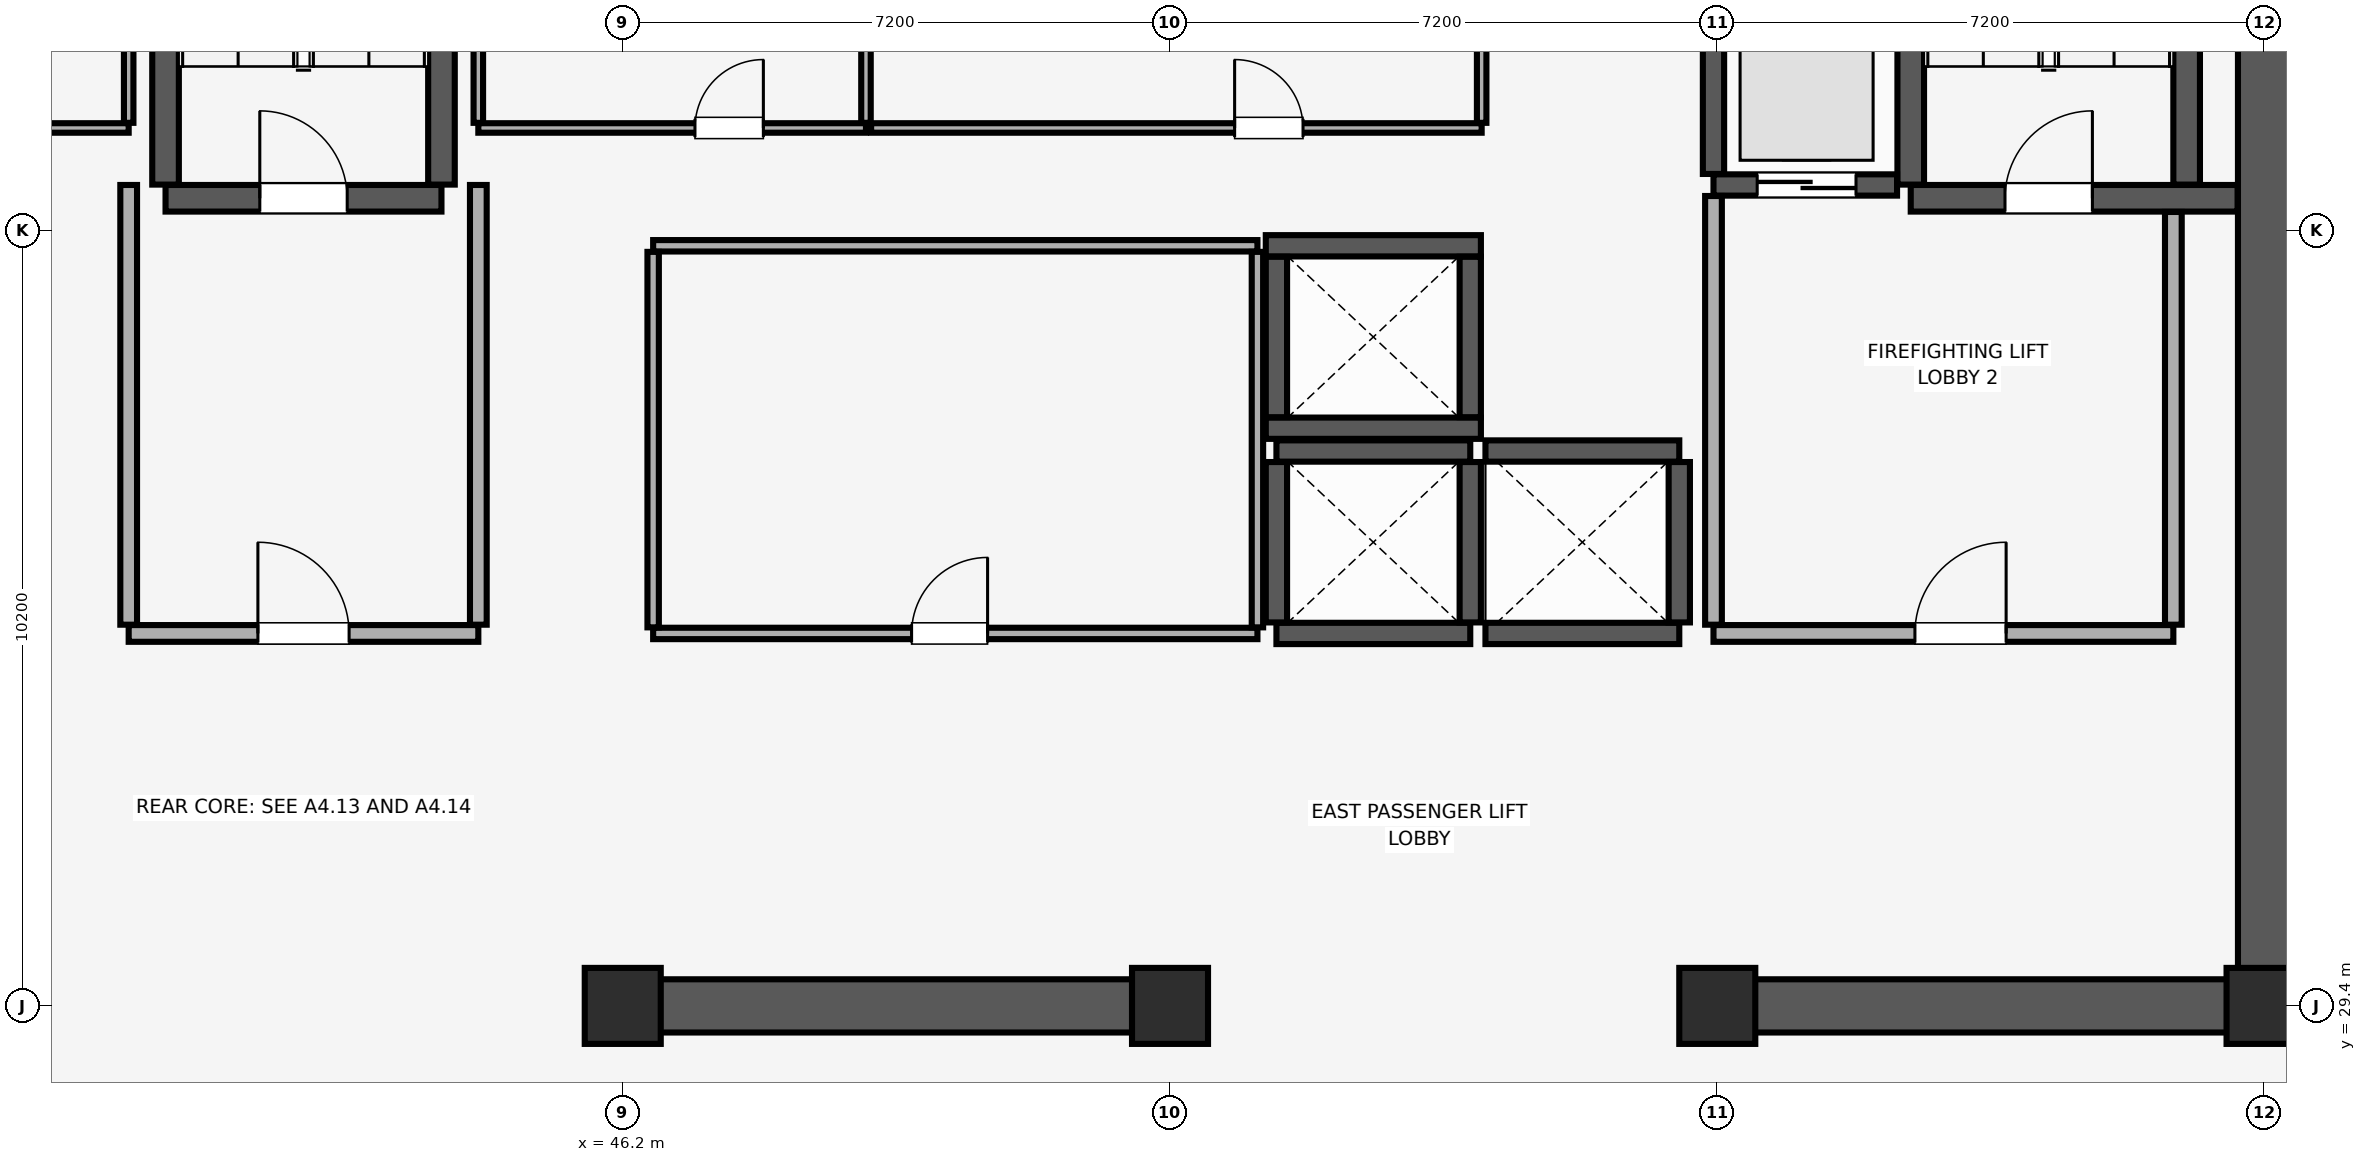
"""IFC4 building model, lengths in metres.
Left out: names, types, materials, properties, quantities, classifications, styles, units other than length and angle.
Written with IfcOpenShell. Run it as: python <this file> out.ifc"""

import sys

from ifc_helpers import new_model, si_unit, direction, frame, frame_2d, origin, origin_2d, place, context, subcontext, project, spatial, rectangle, extrude, element, fill, save


model = new_model("IFC4")
c1 = context("Model", 3, precision=1e-05, world=origin(), true_north=direction((0.0, 1.0)))
c2 = subcontext(c1, "Body", "Model", "MODEL_VIEW")
j1 = project(units=[si_unit("LENGTHUNIT", "METRE"), si_unit("PLANEANGLEUNIT", "RADIAN")], contexts=[c1])
p1 = place(None, origin())
s1 = spatial("IfcSite", under=j1, at=p1, CompositionType="ELEMENT")
p2 = place(p1, origin())
s2 = spatial("IfcBuilding", under=s1, at=p2, CompositionType="ELEMENT")
p3 = place(p2, frame((0.0, 0.0, 280.5)))
s3 = spatial("IfcBuildingStorey", under=s2, at=p3, CompositionType="ELEMENT", Elevation=280.5)
for number, where, z_axis, x_axis in (
    (1, (46.2, 29.4, 0.0), (0.0, 0.0, 1.0), (1.0, 0.0, 0.0)),
    (2, (53.4, 29.4, 0.0), (0.0, 0.0, 1.0), (1.0, 0.0, 0.0)),
    (3, (60.6, 29.4, 0.0), (0.0, 0.0, 1.0), (1.0, 0.0, 0.0)),
    (4, (67.8, 29.4, 0.0), (0.0, 0.0, 1.0), (1.0, 0.0, 0.0)),
):
    element("IfcColumn", number, at=place(p3, frame(where, z_axis=z_axis, x_axis=x_axis)), inside=s3, PredefinedType="COLUMN", context=c2, shape_type="SweptSolid", body=[
        extrude(rectangle(XDim=1.0, YDim=1.0, at=origin_2d()), origin(), (0.0, 0.0, 1.0), 5.1),
    ])
p4 = place(p3, frame((67.8, 29.4, 0.0), z_axis=(0.0, 0.0, 1.0), x_axis=(0.0, 1.0, 0.0)))
e5 = element("IfcWall", 5, at=p4, inside=s3, PredefinedType="SHEAR", context=c2, shape_type="SweptSolid", body=[
    extrude(rectangle(XDim=19.2, YDim=0.7, at=frame_2d((9.6, 0.0))), origin(), (0.0, 0.0, 1.0), 5.1),
])
p5 = place(p3, frame((46.0, 29.4, 0.0), z_axis=(0.0, 0.0, 1.0), x_axis=(1.0, 0.0, 0.0)))
e6 = element("IfcWall", 6, at=p5, inside=s3, PredefinedType="SHEAR", context=c2, shape_type="SweptSolid", body=[
    extrude(rectangle(XDim=7.6, YDim=0.7, at=frame_2d((3.8, 0.0))), origin(), (0.0, 0.0, 1.0), 5.1),
])
p6 = place(p3, frame((60.4, 29.4, 0.0), z_axis=(0.0, 0.0, 1.0), x_axis=(1.0, 0.0, 0.0)))
e7 = element("IfcWall", 7, at=p6, inside=s3, PredefinedType="SHEAR", context=c2, shape_type="SweptSolid", body=[
    extrude(rectangle(XDim=7.045, YDim=0.7, at=frame_2d((3.522, 0.0))), origin(), (0.0, 0.0, 1.0), 5.1),
])
p7 = place(p3, frame((40.185, 40.025, 0.0), z_axis=(0.0, 0.0, 1.0), x_axis=(1.0, 0.0, 0.0)))
e8 = element("IfcWall", 8, at=p7, inside=s3, PredefinedType="SHEAR", context=c2, shape_type="SweptSolid", body=[
    extrude(rectangle(XDim=3.63, YDim=0.35, at=frame_2d((1.815, 0.0))), origin(), (0.0, 0.0, 1.0), 5.1),
])
p8 = place(p7, frame((1.24, 0.0, 0.0)))
e9 = element("IfcOpeningElement", 9, at=p8, cuts=e8, PredefinedType="OPENING", context=c2, shape_type="SweptSolid", body=[
    extrude(rectangle(XDim=1.15, YDim=2.15, at=frame_2d((0.575, 1.075))), frame((0.0, 0.185, 0.0), z_axis=(0.0, -1.0, 0.0), x_axis=(1.0, 0.0, 0.0)), (0.0, 0.0, 1.0), 0.37),
])
for number, where, z_axis, x_axis in (
    (10, (40.185, 40.205, 0.0), (0.0, 0.0, 1.0), (0.0, 1.0, 0.0)),
    (11, (43.815, 40.205, 0.0), (0.0, 0.0, 1.0), (0.0, 1.0, 0.0)),
):
    element("IfcWall", number, at=place(p3, frame(where, z_axis=z_axis, x_axis=x_axis)), inside=s3, PredefinedType="SHEAR", context=c2, shape_type="SweptSolid", body=[
        extrude(rectangle(XDim=8.09, YDim=0.35, at=frame_2d((4.045, 0.0))), origin(), (0.0, 0.0, 1.0), 5.1),
    ])
p9 = place(p3, frame((63.145, 40.025, 0.0), z_axis=(0.0, 0.0, 1.0), x_axis=(1.0, 0.0, 0.0)))
e12 = element("IfcWall", 12, at=p9, inside=s3, PredefinedType="SHEAR", context=c2, shape_type="SweptSolid", body=[
    extrude(rectangle(XDim=4.3, YDim=0.35, at=frame_2d((2.15, 0.0))), origin(), (0.0, 0.0, 1.0), 5.1),
])
p10 = place(p9, frame((1.24, 0.0, 0.0)))
e13 = element("IfcOpeningElement", 13, at=p10, cuts=e12, PredefinedType="OPENING", context=c2, shape_type="SweptSolid", body=[
    extrude(rectangle(XDim=1.15, YDim=2.15, at=frame_2d((0.575, 1.075))), frame((0.0, 0.185, 0.0), z_axis=(0.0, -1.0, 0.0), x_axis=(1.0, 0.0, 0.0)), (0.0, 0.0, 1.0), 0.37),
])
for number, where, z_axis, x_axis in (
    (14, (63.145, 40.205, 0.0), (0.0, 0.0, 1.0), (0.0, 1.0, 0.0)),
    (15, (66.775, 40.205, 0.0), (0.0, 0.0, 1.0), (0.0, 1.0, 0.0)),
):
    element("IfcWall", number, at=place(p3, frame(where, z_axis=z_axis, x_axis=x_axis)), inside=s3, PredefinedType="SHEAR", context=c2, shape_type="SweptSolid", body=[
        extrude(rectangle(XDim=8.09, YDim=0.35, at=frame_2d((4.045, 0.0))), origin(), (0.0, 0.0, 1.0), 5.1),
    ])
for number, where, z_axis, x_axis in (
    (16, (54.8, 34.3, 0.0), (0.0, 0.0, 1.0), (1.0, 0.0, 0.0)),
    (17, (54.8, 36.7, 0.0), (0.0, 0.0, 1.0), (1.0, 0.0, 0.0)),
):
    element("IfcWall", number, at=place(p3, frame(where, z_axis=z_axis, x_axis=x_axis)), inside=s3, PredefinedType="SHEAR", context=c2, shape_type="SweptSolid", body=[
        extrude(rectangle(XDim=2.55, YDim=0.28, at=frame_2d((1.275, 0.0))), origin(), (0.0, 0.0, 1.0), 5.1),
    ])
for number, where, z_axis, x_axis in (
    (18, (54.8, 34.445, 0.0), (0.0, 0.0, 1.0), (0.0, 1.0, 0.0)),
    (19, (57.35, 34.445, 0.0), (0.0, 0.0, 1.0), (0.0, 1.0, 0.0)),
):
    element("IfcWall", number, at=place(p3, frame(where, z_axis=z_axis, x_axis=x_axis)), inside=s3, PredefinedType="SHEAR", context=c2, shape_type="SweptSolid", body=[
        extrude(rectangle(XDim=2.11, YDim=0.28, at=frame_2d((1.055, 0.0))), origin(), (0.0, 0.0, 1.0), 5.1),
    ])
for number, where, z_axis, x_axis in (
    (20, (57.55, 34.3, 0.0), (0.0, 0.0, 1.0), (1.0, 0.0, 0.0)),
    (21, (57.55, 36.7, 0.0), (0.0, 0.0, 1.0), (1.0, 0.0, 0.0)),
):
    element("IfcWall", number, at=place(p3, frame(where, z_axis=z_axis, x_axis=x_axis)), inside=s3, PredefinedType="SHEAR", context=c2, shape_type="SweptSolid", body=[
        extrude(rectangle(XDim=2.55, YDim=0.28, at=frame_2d((1.275, 0.0))), origin(), (0.0, 0.0, 1.0), 5.1),
    ])
p11 = place(p3, frame((60.1, 34.445, 0.0), z_axis=(0.0, 0.0, 1.0), x_axis=(0.0, 1.0, 0.0)))
e22 = element("IfcWall", 22, at=p11, inside=s3, PredefinedType="SHEAR", context=c2, shape_type="SweptSolid", body=[
    extrude(rectangle(XDim=2.11, YDim=0.28, at=frame_2d((1.055, 0.0))), origin(), (0.0, 0.0, 1.0), 5.1),
])
for number, where, z_axis, x_axis in (
    (23, (54.66, 37.0, 0.0), (0.0, 0.0, 1.0), (1.0, 0.0, 0.0)),
    (24, (54.66, 39.4, 0.0), (0.0, 0.0, 1.0), (1.0, 0.0, 0.0)),
):
    element("IfcWall", number, at=place(p3, frame(where, z_axis=z_axis, x_axis=x_axis)), inside=s3, PredefinedType="SHEAR", context=c2, shape_type="SweptSolid", body=[
        extrude(rectangle(XDim=2.83, YDim=0.28, at=frame_2d((1.415, 0.0))), origin(), (0.0, 0.0, 1.0), 5.1),
    ])
for number, where, z_axis, x_axis in (
    (25, (54.8, 37.145, 0.0), (0.0, 0.0, 1.0), (0.0, 1.0, 0.0)),
    (26, (57.35, 37.145, 0.0), (0.0, 0.0, 1.0), (0.0, 1.0, 0.0)),
):
    element("IfcWall", number, at=place(p3, frame(where, z_axis=z_axis, x_axis=x_axis)), inside=s3, PredefinedType="SHEAR", context=c2, shape_type="SweptSolid", body=[
        extrude(rectangle(XDim=2.11, YDim=0.28, at=frame_2d((1.055, 0.0))), origin(), (0.0, 0.0, 1.0), 5.1),
    ])
p12 = place(p3, frame((60.55, 40.2, 0.0), z_axis=(0.0, 0.0, 1.0), x_axis=(1.0, 0.0, 0.0)))
e27 = element("IfcWall", 27, at=p12, inside=s3, PredefinedType="SHEAR", context=c2, shape_type="SweptSolid", body=[
    extrude(rectangle(XDim=2.415, YDim=0.28, at=frame_2d((1.208, 0.0))), origin(), (0.0, 0.0, 1.0), 5.1),
])
p13 = place(p12, frame((0.575, 0.0, 0.0)))
e28 = element("IfcOpeningElement", 28, at=p13, cuts=e27, PredefinedType="OPENING", context=c2, shape_type="SweptSolid", body=[
    extrude(rectangle(XDim=1.3, YDim=2.3, at=frame_2d((0.65, 1.15))), frame((0.0, 0.15, 0.0), z_axis=(0.0, -1.0, 0.0), x_axis=(1.0, 0.0, 0.0)), (0.0, 0.0, 1.0), 0.3),
])
p14 = place(p3, frame((60.55, 40.345, 0.0), z_axis=(0.0, 0.0, 1.0), x_axis=(0.0, 1.0, 0.0)))
e29 = element("IfcWall", 29, at=p14, inside=s3, PredefinedType="SHEAR", context=c2, shape_type="SweptSolid", body=[
    extrude(rectangle(XDim=2.81, YDim=0.28, at=frame_2d((1.405, 0.0))), origin(), (0.0, 0.0, 1.0), 5.1),
])
p15 = place(p3, frame((60.55, 34.3, 0.0), z_axis=(0.0, 0.0, 1.0), x_axis=(1.0, 0.0, 0.0)))
e30 = element("IfcWall", 30, at=p15, inside=s3, PredefinedType="PARTITIONING", context=c2, shape_type="SweptSolid", body=[
    extrude(rectangle(XDim=6.05, YDim=0.22, at=frame_2d((3.025, 0.0))), origin(), (0.0, 0.0, 1.0), 5.1),
])
p16 = place(p15, frame((2.65, 0.0, 0.0)))
e31 = element("IfcOpeningElement", 31, at=p16, cuts=e30, PredefinedType="OPENING", context=c2, shape_type="SweptSolid", body=[
    extrude(rectangle(XDim=1.2, YDim=2.15, at=frame_2d((0.6, 1.075))), frame((0.0, 0.12, 0.0), z_axis=(0.0, -1.0, 0.0), x_axis=(1.0, 0.0, 0.0)), (0.0, 0.0, 1.0), 0.24),
])
p17 = place(p3, frame((60.55, 34.415, 0.0), z_axis=(0.0, 0.0, 1.0), x_axis=(0.0, 1.0, 0.0)))
e32 = element("IfcWall", 32, at=p17, inside=s3, PredefinedType="PARTITIONING", context=c2, shape_type="SweptSolid", body=[
    extrude(rectangle(XDim=5.64, YDim=0.22, at=frame_2d((2.82, 0.0))), origin(), (0.0, 0.0, 1.0), 5.1),
])
p18 = place(p3, frame((66.6, 34.415, 0.0), z_axis=(0.0, 0.0, 1.0), x_axis=(0.0, 1.0, 0.0)))
e33 = element("IfcWall", 33, at=p18, inside=s3, PredefinedType="PARTITIONING", context=c2, shape_type="SweptSolid", body=[
    extrude(rectangle(XDim=5.43, YDim=0.22, at=frame_2d((2.715, 0.0))), origin(), (0.0, 0.0, 1.0), 5.1),
])
p19 = place(p3, frame((39.7, 34.3, 0.0), z_axis=(0.0, 0.0, 1.0), x_axis=(1.0, 0.0, 0.0)))
e34 = element("IfcWall", 34, at=p19, inside=s3, PredefinedType="PARTITIONING", context=c2, shape_type="SweptSolid", body=[
    extrude(rectangle(XDim=4.6, YDim=0.22, at=frame_2d((2.3, 0.0))), origin(), (0.0, 0.0, 1.0), 5.1),
])
p20 = place(p19, frame((1.7, 0.0, 0.0)))
e35 = element("IfcOpeningElement", 35, at=p20, cuts=e34, PredefinedType="OPENING", context=c2, shape_type="SweptSolid", body=[
    extrude(rectangle(XDim=1.2, YDim=2.15, at=frame_2d((0.6, 1.075))), frame((0.0, 0.12, 0.0), z_axis=(0.0, -1.0, 0.0), x_axis=(1.0, 0.0, 0.0)), (0.0, 0.0, 1.0), 0.24),
])
for number, where, z_axis, x_axis in (
    (36, (39.7, 34.415, 0.0), (0.0, 0.0, 1.0), (0.0, 1.0, 0.0)),
    (37, (44.3, 34.415, 0.0), (0.0, 0.0, 1.0), (0.0, 1.0, 0.0)),
):
    element("IfcWall", number, at=place(p3, frame(where, z_axis=z_axis, x_axis=x_axis)), inside=s3, PredefinedType="PARTITIONING", context=c2, shape_type="SweptSolid", body=[
        extrude(rectangle(XDim=5.785, YDim=0.22, at=frame_2d((2.893, 0.0))), origin(), (0.0, 0.0, 1.0), 5.1),
    ])
p21 = place(p3, frame((46.6, 34.3, 0.0), z_axis=(0.0, 0.0, 1.0), x_axis=(1.0, 0.0, 0.0)))
e38 = element("IfcWall", 38, at=p21, inside=s3, PredefinedType="PARTITIONING", context=c2, shape_type="SweptSolid", body=[
    extrude(rectangle(XDim=7.95, YDim=0.15, at=frame_2d((3.975, 0.0))), origin(), (0.0, 0.0, 1.0), 5.1),
])
p22 = place(p21, frame((3.4, 0.0, 0.0)))
e39 = element("IfcOpeningElement", 39, at=p22, cuts=e38, PredefinedType="OPENING", context=c2, shape_type="SweptSolid", body=[
    extrude(rectangle(XDim=1.0, YDim=2.15, at=frame_2d((0.5, 1.075))), frame((0.0, 0.085, 0.0), z_axis=(0.0, -1.0, 0.0), x_axis=(1.0, 0.0, 0.0)), (0.0, 0.0, 1.0), 0.17),
])
p23 = place(p3, frame((46.6, 39.4, 0.0), z_axis=(0.0, 0.0, 1.0), x_axis=(1.0, 0.0, 0.0)))
e40 = element("IfcWall", 40, at=p23, inside=s3, PredefinedType="PARTITIONING", context=c2, shape_type="SweptSolid", body=[
    extrude(rectangle(XDim=7.95, YDim=0.15, at=frame_2d((3.975, 0.0))), origin(), (0.0, 0.0, 1.0), 5.1),
])
for number, where, z_axis, x_axis in (
    (41, (46.6, 34.38, 0.0), (0.0, 0.0, 1.0), (0.0, 1.0, 0.0)),
    (42, (54.55, 34.38, 0.0), (0.0, 0.0, 1.0), (0.0, 1.0, 0.0)),
):
    element("IfcWall", number, at=place(p3, frame(where, z_axis=z_axis, x_axis=x_axis)), inside=s3, PredefinedType="PARTITIONING", context=c2, shape_type="SweptSolid", body=[
        extrude(rectangle(XDim=4.94, YDim=0.15, at=frame_2d((2.47, 0.0))), origin(), (0.0, 0.0, 1.0), 5.1),
    ])
p24 = place(p3, frame((36.11, 40.95, 0.0), z_axis=(0.0, 0.0, 1.0), x_axis=(1.0, 0.0, 0.0)))
e43 = element("IfcWall", 43, at=p24, inside=s3, PredefinedType="PARTITIONING", context=c2, shape_type="SweptSolid", body=[
    extrude(rectangle(XDim=3.59, YDim=0.125, at=frame_2d((1.795, 0.0))), origin(), (0.0, 0.0, 1.0), 5.1),
])
p25 = place(p24, frame((1.34, 0.0, 0.0)))
e44 = element("IfcOpeningElement", 44, at=p25, cuts=e43, PredefinedType="OPENING", context=c2, shape_type="SweptSolid", body=[
    extrude(rectangle(XDim=0.9, YDim=2.1, at=frame_2d((0.45, 1.05))), frame((0.0, 0.073, 0.0), z_axis=(0.0, -1.0, 0.0), x_axis=(1.0, 0.0, 0.0)), (0.0, 0.0, 1.0), 0.145),
])
p26 = place(p3, frame((39.7, 41.018, 0.0), z_axis=(0.0, 0.0, 1.0), x_axis=(0.0, 1.0, 0.0)))
e45 = element("IfcWall", 45, at=p26, inside=s3, PredefinedType="PARTITIONING", context=c2, shape_type="SweptSolid", body=[
    extrude(rectangle(XDim=3.715, YDim=0.125, at=frame_2d((1.857, 0.0))), origin(), (0.0, 0.0, 1.0), 5.1),
])
p27 = place(p3, frame((44.3, 40.95, 0.0), z_axis=(0.0, 0.0, 1.0), x_axis=(1.0, 0.0, 0.0)))
e46 = element("IfcWall", 46, at=p27, inside=s3, PredefinedType="PARTITIONING", context=c2, shape_type="SweptSolid", body=[
    extrude(rectangle(XDim=5.1, YDim=0.125, at=frame_2d((2.55, 0.0))), origin(), (0.0, 0.0, 1.0), 5.1),
])
p28 = place(p27, frame((2.85, 0.0, 0.0)))
e47 = element("IfcOpeningElement", 47, at=p28, cuts=e46, PredefinedType="OPENING", context=c2, shape_type="SweptSolid", body=[
    extrude(rectangle(XDim=0.9, YDim=2.1, at=frame_2d((0.45, 1.05))), frame((0.0, 0.073, 0.0), z_axis=(0.0, -1.0, 0.0), x_axis=(1.0, 0.0, 0.0)), (0.0, 0.0, 1.0), 0.145),
])
for number, where, z_axis, x_axis in (
    (48, (44.3, 41.018, 0.0), (0.0, 0.0, 1.0), (0.0, 1.0, 0.0)),
    (49, (49.4, 41.018, 0.0), (0.0, 0.0, 1.0), (0.0, 1.0, 0.0)),
):
    element("IfcWall", number, at=place(p3, frame(where, z_axis=z_axis, x_axis=x_axis)), inside=s3, PredefinedType="PARTITIONING", context=c2, shape_type="SweptSolid", body=[
        extrude(rectangle(XDim=7.833, YDim=0.125, at=frame_2d((3.916, 0.0))), origin(), (0.0, 0.0, 1.0), 5.1),
    ])
p29 = place(p3, frame((49.468, 40.95, 0.0), z_axis=(0.0, 0.0, 1.0), x_axis=(1.0, 0.0, 0.0)))
e50 = element("IfcWall", 50, at=p29, inside=s3, PredefinedType="PARTITIONING", context=c2, shape_type="SweptSolid", body=[
    extrude(rectangle(XDim=8.032, YDim=0.125, at=frame_2d((4.016, 0.0))), origin(), (0.0, 0.0, 1.0), 5.1),
])
p30 = place(p29, frame((4.782, 0.0, 0.0)))
e51 = element("IfcOpeningElement", 51, at=p30, cuts=e50, PredefinedType="OPENING", context=c2, shape_type="SweptSolid", body=[
    extrude(rectangle(XDim=0.9, YDim=2.1, at=frame_2d((0.45, 1.05))), frame((0.0, 0.073, 0.0), z_axis=(0.0, -1.0, 0.0), x_axis=(1.0, 0.0, 0.0)), (0.0, 0.0, 1.0), 0.145),
])
p31 = place(p3, frame((57.5, 41.018, 0.0), z_axis=(0.0, 0.0, 1.0), x_axis=(0.0, 1.0, 0.0)))
e52 = element("IfcWall", 52, at=p31, inside=s3, PredefinedType="PARTITIONING", context=c2, shape_type="SweptSolid", body=[
    extrude(rectangle(XDim=2.167, YDim=0.125, at=frame_2d((1.084, 0.0))), origin(), (0.0, 0.0, 1.0), 5.1),
])
p32 = place(p8, origin())
e53 = element("IfcDoor", 53, at=p32, inside=s3, OperationType="SINGLE_SWING_LEFT", PredefinedType="DOOR", context=c2, shape_type="SweptSolid", body=[
    extrude(rectangle(XDim=1.15, YDim=2.15, at=frame_2d((0.575, 1.075))), frame((0.0, 0.025, 0.0), z_axis=(0.0, -1.0, 0.0), x_axis=(1.0, 0.0, 0.0)), (0.0, 0.0, 1.0), 0.05),
])
fill(e9, e53)
p33 = place(p10, origin())
e54 = element("IfcDoor", 54, at=p33, inside=s3, OperationType="SINGLE_SWING_RIGHT", PredefinedType="DOOR", context=c2, shape_type="SweptSolid", body=[
    extrude(rectangle(XDim=1.15, YDim=2.15, at=frame_2d((0.575, 1.075))), frame((0.0, 0.025, 0.0), z_axis=(0.0, -1.0, 0.0), x_axis=(1.0, 0.0, 0.0)), (0.0, 0.0, 1.0), 0.05),
])
fill(e13, e54)
p34 = place(p13, origin())
e55 = element("IfcDoor", 55, at=p34, inside=s3, OperationType="DOUBLE_DOOR_SLIDING", PredefinedType="DOOR", context=c2, shape_type="SweptSolid", body=[
    extrude(rectangle(XDim=1.3, YDim=2.3, at=frame_2d((0.65, 1.15))), frame((0.0, 0.025, 0.0), z_axis=(0.0, -1.0, 0.0), x_axis=(1.0, 0.0, 0.0)), (0.0, 0.0, 1.0), 0.05),
])
fill(e28, e55)
p35 = place(p16, origin())
e56 = element("IfcDoor", 56, at=p35, inside=s3, OperationType="SINGLE_SWING_RIGHT", PredefinedType="DOOR", context=c2, shape_type="SweptSolid", body=[
    extrude(rectangle(XDim=1.2, YDim=2.15, at=frame_2d((0.6, 1.075))), frame((0.0, 0.025, 0.0), z_axis=(0.0, -1.0, 0.0), x_axis=(1.0, 0.0, 0.0)), (0.0, 0.0, 1.0), 0.05),
])
fill(e31, e56)
p36 = place(p20, origin())
e57 = element("IfcDoor", 57, at=p36, inside=s3, OperationType="SINGLE_SWING_LEFT", PredefinedType="DOOR", context=c2, shape_type="SweptSolid", body=[
    extrude(rectangle(XDim=1.2, YDim=2.15, at=frame_2d((0.6, 1.075))), frame((0.0, 0.025, 0.0), z_axis=(0.0, -1.0, 0.0), x_axis=(1.0, 0.0, 0.0)), (0.0, 0.0, 1.0), 0.05),
])
fill(e35, e57)
p37 = place(p22, origin())
e58 = element("IfcDoor", 58, at=p37, inside=s3, OperationType="SINGLE_SWING_RIGHT", PredefinedType="DOOR", context=c2, shape_type="SweptSolid", body=[
    extrude(rectangle(XDim=1.0, YDim=2.15, at=frame_2d((0.5, 1.075))), frame((0.0, 0.025, 0.0), z_axis=(0.0, -1.0, 0.0), x_axis=(1.0, 0.0, 0.0)), (0.0, 0.0, 1.0), 0.05),
])
fill(e39, e58)
p38 = place(p28, origin())
e59 = element("IfcDoor", 59, at=p38, inside=s3, OperationType="SINGLE_SWING_RIGHT", PredefinedType="DOOR", context=c2, shape_type="SweptSolid", body=[
    extrude(rectangle(XDim=0.9, YDim=2.1, at=frame_2d((0.45, 1.05))), frame((0.0, 0.025, 0.0), z_axis=(0.0, -1.0, 0.0), x_axis=(1.0, 0.0, 0.0)), (0.0, 0.0, 1.0), 0.05),
])
fill(e47, e59)
p39 = place(p30, origin())
e60 = element("IfcDoor", 60, at=p39, inside=s3, OperationType="SINGLE_SWING_LEFT", PredefinedType="DOOR", context=c2, shape_type="SweptSolid", body=[
    extrude(rectangle(XDim=0.9, YDim=2.1, at=frame_2d((0.45, 1.05))), frame((0.0, 0.025, 0.0), z_axis=(0.0, -1.0, 0.0), x_axis=(1.0, 0.0, 0.0)), (0.0, 0.0, 1.0), 0.05),
])
fill(e51, e60)
save(model, sys.argv[1])
